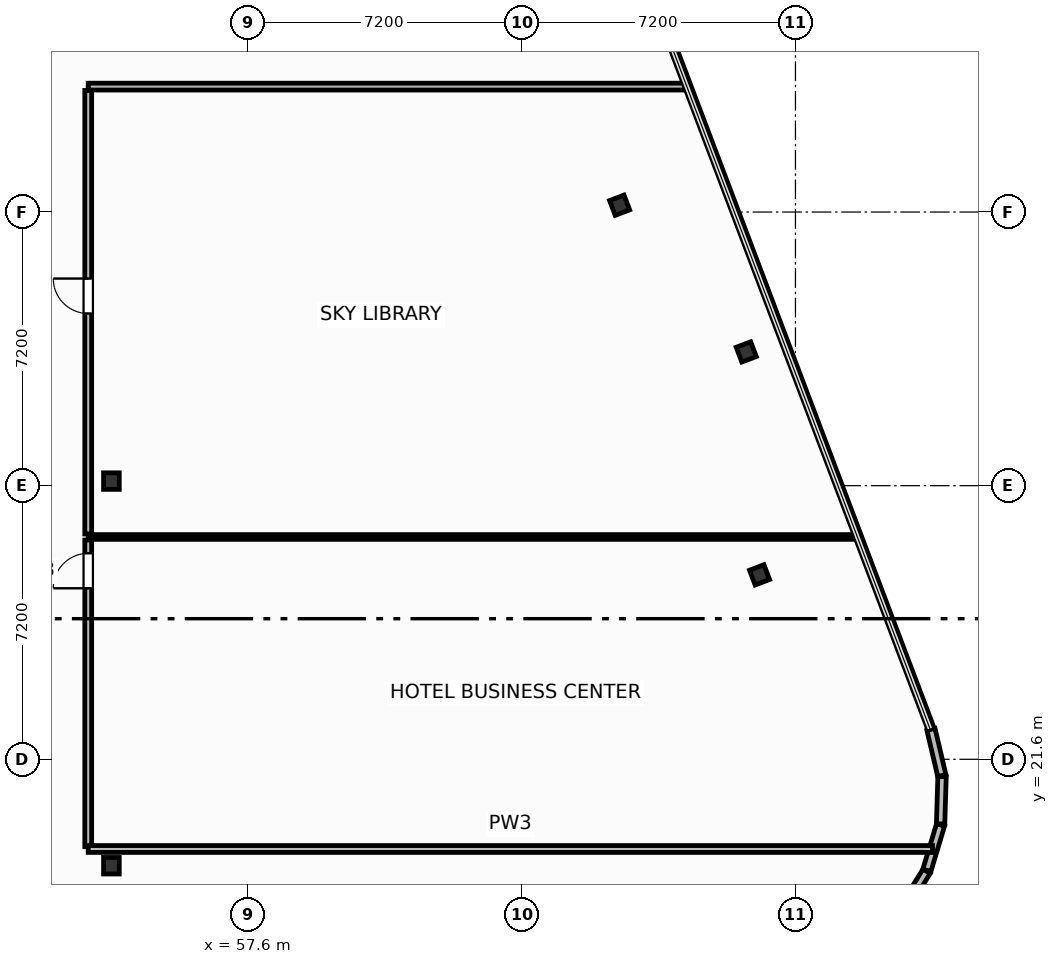
"""IFC4 building model, lengths in metres.
Left out: names, types, materials, properties, quantities, classifications, styles, units other than length and angle.
Written with IfcOpenShell. Run it as: python <this file> out.ifc"""

import sys

from ifc_helpers import new_model, si_unit, direction, frame, frame_2d, origin, origin_2d, place, context, subcontext, project, spatial, rectangle, i_section, extrude, element, fill, save


model = new_model("IFC4")
c1 = context("Model", 3, precision=1e-05, world=origin(), true_north=direction((0.0, 1.0)))
c2 = subcontext(c1, "Body", "Model", "MODEL_VIEW")
j1 = project(units=[si_unit("LENGTHUNIT", "METRE"), si_unit("PLANEANGLEUNIT", "RADIAN")], contexts=[c1])
p1 = place(None, origin())
s1 = spatial("IfcSite", under=j1, at=p1, CompositionType="ELEMENT")
p2 = place(p1, origin())
s2 = spatial("IfcBuilding", under=s1, at=p2, CompositionType="ELEMENT")
p3 = place(p2, frame((0.0, 0.0, 249.7)))
s3 = spatial("IfcBuildingStorey", under=s2, at=p3, CompositionType="ELEMENT", Elevation=249.7)
for number, where, z_axis, x_axis in (
    (1, (54.0, 18.8, 0.0), (0.0, 0.0, 1.0), (1.0, 0.0, 0.0)),
    (2, (54.0, 28.92, 0.0), (0.0, 0.0, 1.0), (1.0, 0.0, 0.0)),
):
    element("IfcColumn", number, at=place(p3, frame(where, z_axis=z_axis, x_axis=x_axis)), inside=s3, PredefinedType="COLUMN", context=c2, shape_type="SweptSolid", body=[
        extrude(i_section(OverallWidth=0.412, OverallDepth=0.435, WebThickness=0.036, FlangeThickness=0.057, FilletRadius=0.025, at=origin_2d()), origin(), (0.0, 0.0, 1.0), 3.7),
    ])
for number, where, z_axis, x_axis in (
    (3, (71.055, 26.453, 0.0), (0.0, 0.0, 1.0), (0.935, 0.354, 0.0)),
    (4, (70.706, 32.32, 0.0), (0.0, 0.0, 1.0), (0.935, 0.354, 0.0)),
    (5, (67.373, 36.18, 0.0), (0.0, 0.0, 1.0), (0.935, 0.354, 0.0)),
):
    element("IfcColumn", number, at=place(p3, frame(where, z_axis=z_axis, x_axis=x_axis)), inside=s3, PredefinedType="COLUMN", context=c2, shape_type="SweptSolid", body=[
        extrude(i_section(OverallWidth=0.406, OverallDepth=0.416, WebThickness=0.03, FlangeThickness=0.048, FilletRadius=0.025, at=origin_2d()), origin(), (0.0, 0.0, 1.0), 3.7),
    ])
for number, where, z_axis, x_axis in (
    (6, (74.794, 17.593, 0.0), (0.0, 0.0, 1.0), (0.527, 0.85, 0.0)),
    (7, (75.458, 18.679, 0.0), (0.0, 0.0, 1.0), (0.288, 0.958, 0.0)),
):
    element("IfcWall", number, at=place(p3, frame(where, z_axis=z_axis, x_axis=x_axis)), inside=s3, PredefinedType="SOLIDWALL", context=c2, shape_type="SweptSolid", body=[
        extrude(rectangle(XDim=1.249, YDim=0.22, at=frame_2d((0.624, 0.0))), origin(), (0.0, 0.0, 1.0), 2.66),
    ])
p4 = place(p3, frame((75.819, 19.899, 0.0), z_axis=(0.0, 0.0, 1.0), x_axis=(0.030898954628, 0.999522513305, 0.0)))
e8 = element("IfcWall", 8, at=p4, inside=s3, PredefinedType="SOLIDWALL", context=c2, shape_type="SweptSolid", body=[
    extrude(rectangle(XDim=1.248, YDim=0.22, at=frame_2d((0.624, 0.0))), origin(), (0.0, 0.0, 1.0), 2.66),
])
p5 = place(p3, frame((75.852, 21.172, 0.0), z_axis=(0.0, 0.0, 1.0), x_axis=(-0.228941257463, 0.973440239887, 0.0)))
e9 = element("IfcWall", 9, at=p5, inside=s3, PredefinedType="SOLIDWALL", context=c2, shape_type="SweptSolid", body=[
    extrude(rectangle(XDim=1.249, YDim=0.22, at=frame_2d((0.625, 0.0))), origin(), (0.0, 0.0, 1.0), 2.66),
])
p6 = place(p3, frame((53.39, 19.3, 0.0), z_axis=(0.0, 0.0, 1.0), x_axis=(0.0, 1.0, 0.0)))
e10 = element("IfcWall", 10, at=p6, inside=s3, PredefinedType="PARTITIONING", context=c2, shape_type="SweptSolid", body=[
    extrude(rectangle(XDim=8.07, YDim=0.18, at=frame_2d((4.035, 0.0))), origin(), (0.0, 0.0, 1.0), 3.38),
])
p7 = place(p6, frame((6.8, 0.0, 0.0)))
e11 = element("IfcOpeningElement", 11, at=p7, cuts=e10, PredefinedType="OPENING", context=c2, shape_type="SweptSolid", body=[
    extrude(rectangle(XDim=0.92, YDim=2.05, at=frame_2d((0.46, 1.025))), frame((0.0, 0.1, 0.0), z_axis=(0.0, -1.0, 0.0), x_axis=(1.0, 0.0, 0.0)), (0.0, 0.0, 1.0), 0.2),
])
p8 = place(p3, frame((53.39, 27.53, 0.0), z_axis=(0.0, 0.0, 1.0), x_axis=(0.0, 1.0, 0.0)))
e12 = element("IfcWall", 12, at=p8, inside=s3, PredefinedType="PARTITIONING", context=c2, shape_type="SweptSolid", body=[
    extrude(rectangle(XDim=11.67, YDim=0.18, at=frame_2d((5.835, 0.0))), origin(), (0.0, 0.0, 1.0), 3.38),
])
p9 = place(p8, frame((5.8, 0.0, 0.0)))
e13 = element("IfcOpeningElement", 13, at=p9, cuts=e12, PredefinedType="OPENING", context=c2, shape_type="SweptSolid", body=[
    extrude(rectangle(XDim=0.92, YDim=2.05, at=frame_2d((0.46, 1.025))), frame((0.0, 0.1, 0.0), z_axis=(0.0, -1.0, 0.0), x_axis=(1.0, 0.0, 0.0)), (0.0, 0.0, 1.0), 0.2),
])
p10 = place(p3, frame((53.39, 27.45, 0.0), z_axis=(0.0, 0.0, 1.0), x_axis=(1.0, 0.0, 0.0)))
e14 = element("IfcWall", 14, at=p10, inside=s3, PredefinedType="PARTITIONING", context=c2, shape_type="SweptSolid", body=[
    extrude(rectangle(XDim=20.199, YDim=0.125, at=frame_2d((10.1, 0.0))), origin(), (0.0, 0.0, 1.0), 1.165),
])
p11 = place(p3, frame((53.39, 19.24, 0.0), z_axis=(0.0, 0.0, 1.0), x_axis=(1.0, 0.0, 0.0)))
e15 = element("IfcWall", 15, at=p11, inside=s3, PredefinedType="PARTITIONING", context=c2, shape_type="SweptSolid", body=[
    extrude(rectangle(XDim=22.217, YDim=0.18, at=frame_2d((11.108, 0.0))), origin(), (0.0, 0.0, 1.0), 1.165),
])
p12 = place(p3, frame((53.39, 39.3, 0.0), z_axis=(0.0, 0.0, 1.0), x_axis=(1.0, 0.0, 0.0)))
e16 = element("IfcWall", 16, at=p12, inside=s3, PredefinedType="PARTITIONING", context=c2, shape_type="SweptSolid", body=[
    extrude(rectangle(XDim=15.713, YDim=0.18, at=frame_2d((7.856, 0.0))), origin(), (0.0, 0.0, 1.0), 3.38),
])
p13 = place(p7, origin())
e17 = element("IfcDoor", 17, at=p13, inside=s3, OperationType="SINGLE_SWING_LEFT", PredefinedType="DOOR", context=c2, shape_type="SweptSolid", body=[
    extrude(rectangle(XDim=0.92, YDim=2.05, at=frame_2d((0.46, 1.025))), frame((0.0, 0.025, 0.0), z_axis=(0.0, -1.0, 0.0), x_axis=(1.0, 0.0, 0.0)), (0.0, 0.0, 1.0), 0.05),
])
fill(e11, e17)
p14 = place(p9, origin())
e18 = element("IfcDoor", 18, at=p14, inside=s3, OperationType="SINGLE_SWING_RIGHT", PredefinedType="DOOR", context=c2, shape_type="SweptSolid", body=[
    extrude(rectangle(XDim=0.92, YDim=2.05, at=frame_2d((0.46, 1.025))), frame((0.0, 0.025, 0.0), z_axis=(0.0, -1.0, 0.0), x_axis=(1.0, 0.0, 0.0)), (0.0, 0.0, 1.0), 0.05),
])
fill(e13, e18)
save(model, sys.argv[1])
